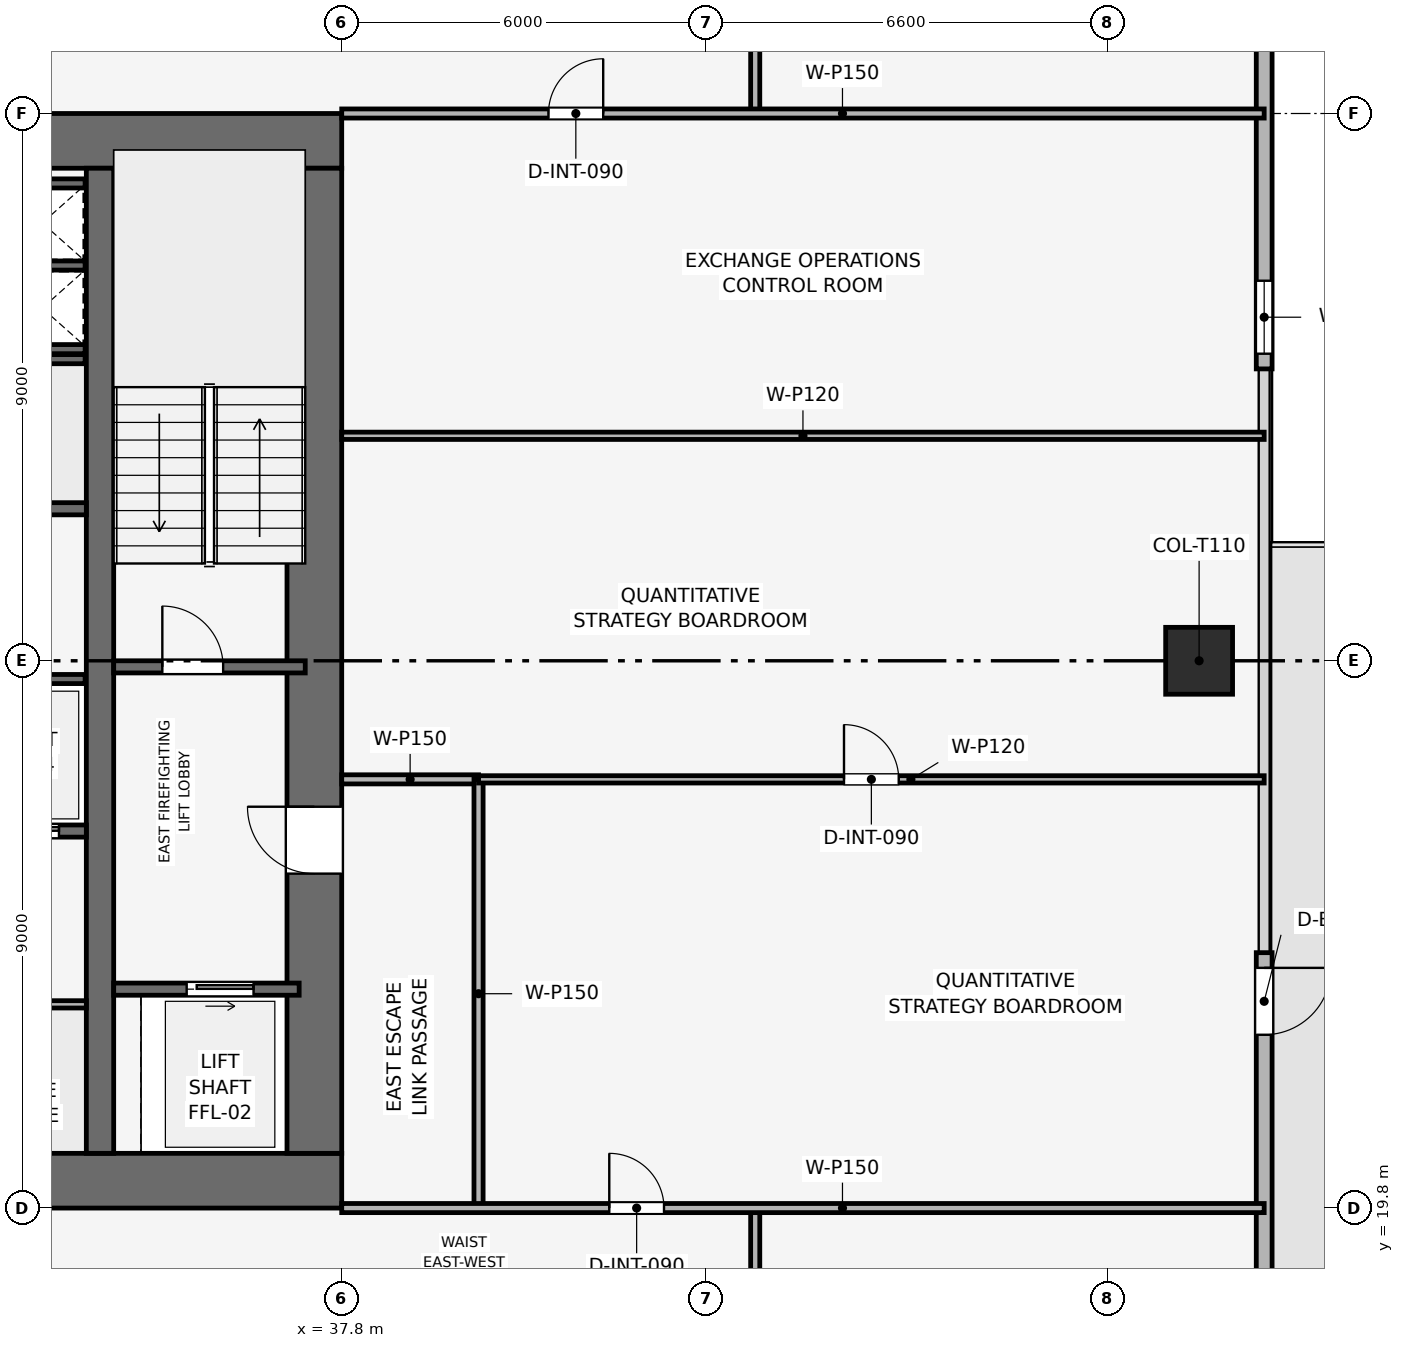
"""IFC4 building model, lengths in metres.
Left out: names, types, materials, properties, quantities, classifications, styles, units other than length and angle.
Written with IfcOpenShell. Run it as: python <this file> out.ifc"""

import sys

from ifc_helpers import new_model, si_unit, direction, frame, frame_2d, origin, origin_2d, place, context, subcontext, project, spatial, rectangle, extrude, element, fill, save


model = new_model("IFC4")
c1 = context("Model", 3, precision=1e-05, world=origin(), true_north=direction((0.0, 1.0)))
c2 = subcontext(c1, "Body", "Model", "MODEL_VIEW")
j1 = project(units=[si_unit("LENGTHUNIT", "METRE"), si_unit("PLANEANGLEUNIT", "RADIAN")], contexts=[c1])
p1 = place(None, origin())
s1 = spatial("IfcSite", under=j1, at=p1, CompositionType="ELEMENT")
p2 = place(p1, origin())
s2 = spatial("IfcBuilding", under=s1, at=p2, CompositionType="ELEMENT")
p3 = place(p2, frame((0.0, 0.0, 160.8)))
s3 = spatial("IfcBuildingStorey", under=s2, at=p3, CompositionType="ELEMENT", Elevation=160.8)
p4 = place(p3, frame((19.8, 20.25, 0.0), z_axis=(0.0, 0.0, 1.0), x_axis=(1.0, 0.0, 0.0)))
e1 = element("IfcWall", 1, at=p4, inside=s3, PredefinedType="SHEAR", context=c2, shape_type="SweptSolid", body=[
    extrude(rectangle(XDim=18.0, YDim=0.9, at=frame_2d((9.0, 0.0))), origin(), (0.0, 0.0, 1.0), 3.75),
])
p5 = place(p4, frame((8.4, 0.0, 0.0)))
e2 = element("IfcOpeningElement", 2, at=p5, cuts=e1, PredefinedType="OPENING", context=c2, shape_type="SweptSolid", body=[
    extrude(rectangle(XDim=1.2, YDim=2.2, at=frame_2d((0.6, 1.1))), frame((0.0, 0.46, 0.0), z_axis=(0.0, -1.0, 0.0), x_axis=(1.0, 0.0, 0.0)), (0.0, 0.0, 1.0), 0.92),
])
p6 = place(p3, frame((19.8, 37.35, 0.0), z_axis=(0.0, 0.0, 1.0), x_axis=(1.0, 0.0, 0.0)))
e3 = element("IfcWall", 3, at=p6, inside=s3, PredefinedType="SHEAR", context=c2, shape_type="SweptSolid", body=[
    extrude(rectangle(XDim=18.0, YDim=0.9, at=frame_2d((9.0, 0.0))), origin(), (0.0, 0.0, 1.0), 3.75),
])
p7 = place(p6, frame((7.05, 0.0, 0.0)))
e4 = element("IfcOpeningElement", 4, at=p7, cuts=e3, PredefinedType="OPENING", context=c2, shape_type="SweptSolid", body=[
    extrude(rectangle(XDim=1.1, YDim=2.15, at=frame_2d((0.55, 1.075))), frame((0.0, 0.46, 0.0), z_axis=(0.0, -1.0, 0.0), x_axis=(1.0, 0.0, 0.0)), (0.0, 0.0, 1.0), 0.92),
])
p8 = place(p3, frame((37.35, 20.7, 0.0), z_axis=(0.0, 0.0, 1.0), x_axis=(0.0, 1.0, 0.0)))
e5 = element("IfcWall", 5, at=p8, inside=s3, PredefinedType="SHEAR", context=c2, shape_type="SweptSolid", body=[
    extrude(rectangle(XDim=16.2, YDim=0.9, at=frame_2d((8.1, 0.0))), origin(), (0.0, 0.0, 1.0), 3.75),
])
p9 = place(p8, frame((4.6, 0.0, 0.0)))
e6 = element("IfcOpeningElement", 6, at=p9, cuts=e5, PredefinedType="OPENING", context=c2, shape_type="SweptSolid", body=[
    extrude(rectangle(XDim=1.1, YDim=2.15, at=frame_2d((0.55, 1.075))), frame((0.0, 0.46, 0.0), z_axis=(0.0, -1.0, 0.0), x_axis=(1.0, 0.0, 0.0)), (0.0, 0.0, 1.0), 0.92),
])
p10 = place(p3, frame((33.825, 20.7, 0.0), z_axis=(0.0, 0.0, 1.0), x_axis=(0.0, 1.0, 0.0)))
e7 = element("IfcWall", 7, at=p10, inside=s3, PredefinedType="SHEAR", context=c2, shape_type="SweptSolid", body=[
    extrude(rectangle(XDim=16.2, YDim=0.45, at=frame_2d((8.1, 0.0))), origin(), (0.0, 0.0, 1.0), 3.75),
])
p11 = place(p3, frame((51.9, 28.8, 0.003), z_axis=(0.0, 0.0, 1.0), x_axis=(1.0, 0.0, 0.0)))
e8 = element("IfcColumn", 8, at=p11, inside=s3, PredefinedType="COLUMN", context=c2, shape_type="SweptSolid", body=[
    extrude(rectangle(XDim=1.1, YDim=1.1, at=origin_2d()), origin(), (0.0, 0.0, 1.0), 3.489),
])
p12 = place(p3, frame((52.97, 46.2, 0.0), z_axis=(0.0, 0.0, 1.0), x_axis=(0.0, -1.0, 0.0)))
e9 = element("IfcWall", 9, at=p12, inside=s3, PredefinedType="SOLIDWALL", context=c2, shape_type="SweptSolid", body=[
    extrude(rectangle(XDim=12.6, YDim=0.26, at=frame_2d((6.3, 0.0))), origin(), (0.0, 0.0, 1.0), 3.495),
])
p13 = place(p12, frame((11.15, 0.0, 0.9)))
e10 = element("IfcOpeningElement", 10, at=p13, cuts=e9, PredefinedType="OPENING", context=c2, shape_type="SweptSolid", body=[
    extrude(rectangle(XDim=1.2, YDim=2.1, at=frame_2d((0.6, 1.05))), frame((0.0, 0.14, 0.0), z_axis=(0.0, -1.0, 0.0), x_axis=(1.0, 0.0, 0.0)), (0.0, 0.0, 1.0), 0.28),
])
p14 = place(p3, frame((52.97, 24.0, 0.0), z_axis=(0.0, 0.0, 1.0), x_axis=(0.0, -1.0, 0.0)))
e11 = element("IfcWall", 11, at=p14, inside=s3, PredefinedType="SOLIDWALL", context=c2, shape_type="SweptSolid", body=[
    extrude(rectangle(XDim=12.6, YDim=0.26, at=frame_2d((6.3, 0.0))), origin(), (0.0, 0.0, 1.0), 3.495),
])
p15 = place(p14, frame((0.25, 0.0, 0.0)))
e12 = element("IfcOpeningElement", 12, at=p15, cuts=e11, PredefinedType="OPENING", context=c2, shape_type="SweptSolid", body=[
    extrude(rectangle(XDim=1.1, YDim=2.2, at=frame_2d((0.55, 1.1))), frame((0.0, 0.14, 0.0), z_axis=(0.0, -1.0, 0.0), x_axis=(1.0, 0.0, 0.0)), (0.0, 0.0, 1.0), 0.28),
])
p16 = place(p3, frame((34.05, 28.7, 0.0), z_axis=(0.0, 0.0, 1.0), x_axis=(1.0, 0.0, 0.0)))
e13 = element("IfcWall", 13, at=p16, inside=s3, PredefinedType="SHEAR", context=c2, shape_type="SweptSolid", body=[
    extrude(rectangle(XDim=3.15, YDim=0.2, at=frame_2d((1.575, 0.0))), origin(), (0.0, 0.0, 1.0), 3.495),
])
p17 = place(p16, frame((0.8, 0.0, 0.0)))
e14 = element("IfcOpeningElement", 14, at=p17, cuts=e13, PredefinedType="OPENING", context=c2, shape_type="SweptSolid", body=[
    extrude(rectangle(XDim=1.0, YDim=2.1, at=frame_2d((0.5, 1.05))), frame((0.0, 0.11, 0.0), z_axis=(0.0, -1.0, 0.0), x_axis=(1.0, 0.0, 0.0)), (0.0, 0.0, 1.0), 0.22),
])
for number, where, z_axis, x_axis in (
    (15, (32.25, 33.925, 0.0), (0.0, 0.0, 1.0), (1.0, 0.0, 0.0)),
    (16, (32.25, 35.3, 0.0), (0.0, 0.0, 1.0), (1.0, 0.0, 0.0)),
):
    element("IfcWall", number, at=place(p3, frame(where, z_axis=z_axis, x_axis=x_axis)), inside=s3, PredefinedType="SHEAR", context=c2, shape_type="SweptSolid", body=[
        extrude(rectangle(XDim=1.33, YDim=0.15, at=frame_2d((0.665, 0.0))), origin(), (0.0, 0.0, 1.0), 3.495),
    ])
p18 = place(p3, frame((34.05, 23.4, 0.0), z_axis=(0.0, 0.0, 1.0), x_axis=(1.0, 0.0, 0.0)))
e17 = element("IfcWall", 17, at=p18, inside=s3, PredefinedType="SHEAR", context=c2, shape_type="SweptSolid", body=[
    extrude(rectangle(XDim=3.05, YDim=0.2, at=frame_2d((1.525, 0.0))), origin(), (0.0, 0.0, 1.0), 3.495),
])
p19 = place(p18, frame((1.2, 0.0, 0.0)))
e18 = element("IfcOpeningElement", 18, at=p19, cuts=e17, PredefinedType="OPENING", context=c2, shape_type="SweptSolid", body=[
    extrude(rectangle(XDim=1.1, YDim=2.15, at=frame_2d((0.55, 1.075))), frame((0.0, 0.11, 0.0), z_axis=(0.0, -1.0, 0.0), x_axis=(1.0, 0.0, 0.0)), (0.0, 0.0, 1.0), 0.22),
])
p20 = place(p3, frame((31.6, 26.0, 0.0), z_axis=(0.0, 0.0, 1.0), x_axis=(1.0, 0.0, 0.0)))
e19 = element("IfcWall", 19, at=p20, inside=s3, PredefinedType="SHEAR", context=c2, shape_type="SweptSolid", body=[
    extrude(rectangle(XDim=2.0, YDim=0.2, at=frame_2d((1.0, 0.0))), origin(), (0.0, 0.0, 1.0), 3.495),
])
p21 = place(p20, frame((0.45, 0.0, 0.0)))
e20 = element("IfcOpeningElement", 20, at=p21, cuts=e19, PredefinedType="OPENING", context=c2, shape_type="SweptSolid", body=[
    extrude(rectangle(XDim=1.1, YDim=2.15, at=frame_2d((0.55, 1.075))), frame((0.0, 0.11, 0.0), z_axis=(0.0, -1.0, 0.0), x_axis=(1.0, 0.0, 0.0)), (0.0, 0.0, 1.0), 0.22),
])
p22 = place(p3, frame((31.6, 31.3, 0.0), z_axis=(0.0, 0.0, 1.0), x_axis=(1.0, 0.0, 0.0)))
e21 = element("IfcWall", 21, at=p22, inside=s3, PredefinedType="SHEAR", context=c2, shape_type="SweptSolid", body=[
    extrude(rectangle(XDim=2.0, YDim=0.2, at=frame_2d((1.0, 0.0))), origin(), (0.0, 0.0, 1.0), 3.495),
])
p23 = place(p3, frame((32.25, 36.65, 0.0), z_axis=(0.0, 0.0, 1.0), x_axis=(1.0, 0.0, 0.0)))
e22 = element("IfcWall", 22, at=p23, inside=s3, PredefinedType="SHEAR", context=c2, shape_type="SweptSolid", body=[
    extrude(rectangle(XDim=1.33, YDim=0.15, at=frame_2d((0.665, 0.0))), origin(), (0.0, 0.0, 1.0), 3.495),
])
for number, where, z_axis, x_axis in (
    (23, (29.5, 28.5, 0.0), (0.0, 0.0, 1.0), (1.0, 0.0, 0.0)),
    (24, (29.5, 33.76, 0.0), (0.0, 0.0, 1.0), (1.0, 0.0, 0.0)),
):
    element("IfcWall", number, at=place(p3, frame(where, z_axis=z_axis, x_axis=x_axis)), inside=s3, PredefinedType="SHEAR", context=c2, shape_type="SweptSolid", body=[
        extrude(rectangle(XDim=4.08, YDim=0.15, at=frame_2d((2.04, 0.0))), origin(), (0.0, 0.0, 1.0), 3.495),
    ])
p24 = place(p3, frame((29.55, 23.15, 0.0), z_axis=(0.0, 0.0, 1.0), x_axis=(1.0, 0.0, 0.0)))
e25 = element("IfcWall", 25, at=p24, inside=s3, PredefinedType="PARTITIONING", context=c2, shape_type="SweptSolid", body=[
    extrude(rectangle(XDim=4.05, YDim=0.12, at=frame_2d((2.025, 0.0))), origin(), (0.0, 0.0, 1.0), 3.495),
])
p25 = place(p24, frame((1.575, 0.0, 0.0)))
e26 = element("IfcOpeningElement", 26, at=p25, cuts=e25, PredefinedType="OPENING", context=c2, shape_type="SweptSolid", body=[
    extrude(rectangle(XDim=0.9, YDim=2.1, at=frame_2d((0.45, 1.05))), frame((0.0, 0.07, 0.0), z_axis=(0.0, -1.0, 0.0), x_axis=(1.0, 0.0, 0.0)), (0.0, 0.0, 1.0), 0.14),
])
p26 = place(p3, frame((37.8, 26.85, 0.0), z_axis=(0.0, 0.0, 1.0), x_axis=(1.0, 0.0, 0.0)))
e27 = element("IfcWall", 27, at=p26, inside=s3, PredefinedType="PARTITIONING", context=c2, shape_type="SweptSolid", body=[
    extrude(rectangle(XDim=2.25, YDim=0.15, at=frame_2d((1.125, 0.0))), origin(), (0.0, 0.0, 1.0), 3.495),
])
p27 = place(p3, frame((40.05, 19.8, 0.0), z_axis=(0.0, 0.0, 1.0), x_axis=(0.0, 1.0, 0.0)))
e28 = element("IfcWall", 28, at=p27, inside=s3, PredefinedType="PARTITIONING", context=c2, shape_type="SweptSolid", body=[
    extrude(rectangle(XDim=7.05, YDim=0.15, at=frame_2d((3.525, 0.0))), origin(), (0.0, 0.0, 1.0), 3.03),
])
p28 = place(p3, frame((40.05, 26.85, 0.0), z_axis=(0.0, 0.0, 1.0), x_axis=(1.0, 0.0, 0.0)))
e29 = element("IfcWall", 29, at=p28, inside=s3, PredefinedType="PARTITIONING", context=c2, shape_type="SweptSolid", body=[
    extrude(rectangle(XDim=12.92, YDim=0.12, at=frame_2d((6.46, 0.0))), origin(), (0.0, 0.0, 1.0), 2.98),
])
p29 = place(p28, frame((6.01, 0.0, 0.0)))
e30 = element("IfcOpeningElement", 30, at=p29, cuts=e29, PredefinedType="OPENING", context=c2, shape_type="SweptSolid", body=[
    extrude(rectangle(XDim=0.9, YDim=2.1, at=frame_2d((0.45, 1.05))), frame((0.0, 0.07, 0.0), z_axis=(0.0, -1.0, 0.0), x_axis=(1.0, 0.0, 0.0)), (0.0, 0.0, 1.0), 0.14),
])
p30 = place(p3, frame((37.8, 32.5, 0.0), z_axis=(0.0, 0.0, 1.0), x_axis=(1.0, 0.0, 0.0)))
e31 = element("IfcWall", 31, at=p30, inside=s3, PredefinedType="PARTITIONING", context=c2, shape_type="SweptSolid", body=[
    extrude(rectangle(XDim=15.17, YDim=0.12, at=frame_2d((7.585, 0.0))), origin(), (0.0, 0.0, 1.0), 2.98),
])
p31 = place(p3, frame((44.6, 17.4, 0.0), z_axis=(0.0, 0.0, 1.0), x_axis=(0.0, 1.0, 0.0)))
e32 = element("IfcWall", 32, at=p31, inside=s3, PredefinedType="PARTITIONING", context=c2, shape_type="SweptSolid", body=[
    extrude(rectangle(XDim=2.4, YDim=0.15, at=frame_2d((1.2, 0.0))), origin(), (0.0, 0.0, 1.0), 3.495),
])
p32 = place(p3, frame((44.6, 37.8, 0.0), z_axis=(0.0, 0.0, 1.0), x_axis=(0.0, 1.0, 0.0)))
e33 = element("IfcWall", 33, at=p32, inside=s3, PredefinedType="PARTITIONING", context=c2, shape_type="SweptSolid", body=[
    extrude(rectangle(XDim=2.4, YDim=0.15, at=frame_2d((1.2, 0.0))), origin(), (0.0, 0.0, 1.0), 3.495),
])
p33 = place(p3, frame((37.8, 19.8, 0.0), z_axis=(0.0, 0.0, 1.0), x_axis=(1.0, 0.0, 0.0)))
e34 = element("IfcWall", 34, at=p33, inside=s3, PredefinedType="PARTITIONING", context=c2, shape_type="SweptSolid", body=[
    extrude(rectangle(XDim=15.17, YDim=0.15, at=frame_2d((7.585, 0.0))), origin(), (0.0, 0.0, 1.0), 2.98),
])
p34 = place(p33, frame((4.4, 0.0, 0.0)))
e35 = element("IfcOpeningElement", 35, at=p34, cuts=e34, PredefinedType="OPENING", context=c2, shape_type="SweptSolid", body=[
    extrude(rectangle(XDim=0.9, YDim=2.1, at=frame_2d((0.45, 1.05))), frame((0.0, 0.085, 0.0), z_axis=(0.0, -1.0, 0.0), x_axis=(1.0, 0.0, 0.0)), (0.0, 0.0, 1.0), 0.17),
])
p35 = place(p3, frame((37.8, 37.8, 0.0), z_axis=(0.0, 0.0, 1.0), x_axis=(1.0, 0.0, 0.0)))
e36 = element("IfcWall", 36, at=p35, inside=s3, PredefinedType="PARTITIONING", context=c2, shape_type="SweptSolid", body=[
    extrude(rectangle(XDim=15.17, YDim=0.15, at=frame_2d((7.585, 0.0))), origin(), (0.0, 0.0, 1.0), 2.98),
])
p36 = place(p35, frame((3.4, 0.0, 0.0)))
e37 = element("IfcOpeningElement", 37, at=p36, cuts=e36, PredefinedType="OPENING", context=c2, shape_type="SweptSolid", body=[
    extrude(rectangle(XDim=0.9, YDim=2.1, at=frame_2d((0.45, 1.05))), frame((0.0, 0.085, 0.0), z_axis=(0.0, -1.0, 0.0), x_axis=(1.0, 0.0, 0.0)), (0.0, 0.0, 1.0), 0.17),
])
p37 = place(p15, origin())
e38 = element("IfcDoor", 38, at=p37, inside=s3, OperationType="SINGLE_SWING_LEFT", PredefinedType="DOOR", context=c2, shape_type="SweptSolid", body=[
    extrude(rectangle(XDim=1.1, YDim=2.2, at=frame_2d((0.55, 1.1))), frame((0.0, 0.025, 0.0), z_axis=(0.0, -1.0, 0.0), x_axis=(1.0, 0.0, 0.0)), (0.0, 0.0, 1.0), 0.05),
])
fill(e12, e38)
p38 = place(p13, origin())
e39 = element("IfcWindow", 39, at=p38, inside=s3, PartitioningType="SINGLE_PANEL", PredefinedType="WINDOW", context=c2, shape_type="SweptSolid", body=[
    extrude(rectangle(XDim=1.2, YDim=2.1, at=frame_2d((0.6, 1.05))), frame((0.0, 0.03, 0.0), z_axis=(0.0, -1.0, 0.0), x_axis=(1.0, 0.0, 0.0)), (0.0, 0.0, 1.0), 0.06),
])
fill(e10, e39)
p39 = place(p17, origin())
e40 = element("IfcDoor", 40, at=p39, inside=s3, OperationType="SINGLE_SWING_LEFT", PredefinedType="DOOR", context=c2, shape_type="SweptSolid", body=[
    extrude(rectangle(XDim=1.0, YDim=2.1, at=frame_2d((0.5, 1.05))), frame((0.0, 0.025, 0.0), z_axis=(0.0, -1.0, 0.0), x_axis=(1.0, 0.0, 0.0)), (0.0, 0.0, 1.0), 0.05),
])
fill(e14, e40)
p40 = place(p19, origin())
e41 = element("IfcDoor", 41, at=p40, inside=s3, OperationType="SLIDING_TO_RIGHT", PredefinedType="DOOR", context=c2, shape_type="SweptSolid", body=[
    extrude(rectangle(XDim=1.1, YDim=2.15, at=frame_2d((0.55, 1.075))), frame((0.0, 0.025, 0.0), z_axis=(0.0, -1.0, 0.0), x_axis=(1.0, 0.0, 0.0)), (0.0, 0.0, 1.0), 0.05),
])
fill(e18, e41)
p41 = place(p21, origin())
e42 = element("IfcDoor", 42, at=p41, inside=s3, OperationType="SLIDING_TO_RIGHT", PredefinedType="DOOR", context=c2, shape_type="SweptSolid", body=[
    extrude(rectangle(XDim=1.1, YDim=2.15, at=frame_2d((0.55, 1.075))), frame((0.0, 0.025, 0.0), z_axis=(0.0, -1.0, 0.0), x_axis=(1.0, 0.0, 0.0)), (0.0, 0.0, 1.0), 0.05),
])
fill(e20, e42)
p42 = place(p29, origin())
e43 = element("IfcDoor", 43, at=p42, inside=s3, OperationType="SINGLE_SWING_LEFT", PredefinedType="DOOR", context=c2, shape_type="SweptSolid", body=[
    extrude(rectangle(XDim=0.9, YDim=2.1, at=frame_2d((0.45, 1.05))), frame((0.0, 0.025, 0.0), z_axis=(0.0, -1.0, 0.0), x_axis=(1.0, 0.0, 0.0)), (0.0, 0.0, 1.0), 0.05),
])
fill(e30, e43)
p43 = place(p34, origin())
e44 = element("IfcDoor", 44, at=p43, inside=s3, OperationType="SINGLE_SWING_LEFT", PredefinedType="DOOR", context=c2, shape_type="SweptSolid", body=[
    extrude(rectangle(XDim=0.9, YDim=2.1, at=frame_2d((0.45, 1.05))), frame((0.0, 0.025, 0.0), z_axis=(0.0, -1.0, 0.0), x_axis=(1.0, 0.0, 0.0)), (0.0, 0.0, 1.0), 0.05),
])
fill(e35, e44)
p44 = place(p36, origin())
e45 = element("IfcDoor", 45, at=p44, inside=s3, OperationType="SINGLE_SWING_RIGHT", PredefinedType="DOOR", context=c2, shape_type="SweptSolid", body=[
    extrude(rectangle(XDim=0.9, YDim=2.1, at=frame_2d((0.45, 1.05))), frame((0.0, 0.025, 0.0), z_axis=(0.0, -1.0, 0.0), x_axis=(1.0, 0.0, 0.0)), (0.0, 0.0, 1.0), 0.05),
])
fill(e37, e45)
p45 = place(p9, origin())
e46 = element("IfcDoor", 46, at=p45, inside=s3, OperationType="SINGLE_SWING_RIGHT", PredefinedType="DOOR", context=c2, shape_type="SweptSolid", body=[
    extrude(rectangle(XDim=1.1, YDim=2.15, at=frame_2d((0.55, 1.075))), frame((0.0, 0.025, 0.0), z_axis=(0.0, -1.0, 0.0), x_axis=(1.0, 0.0, 0.0)), (0.0, 0.0, 1.0), 0.05),
])
fill(e6, e46)
save(model, sys.argv[1])
